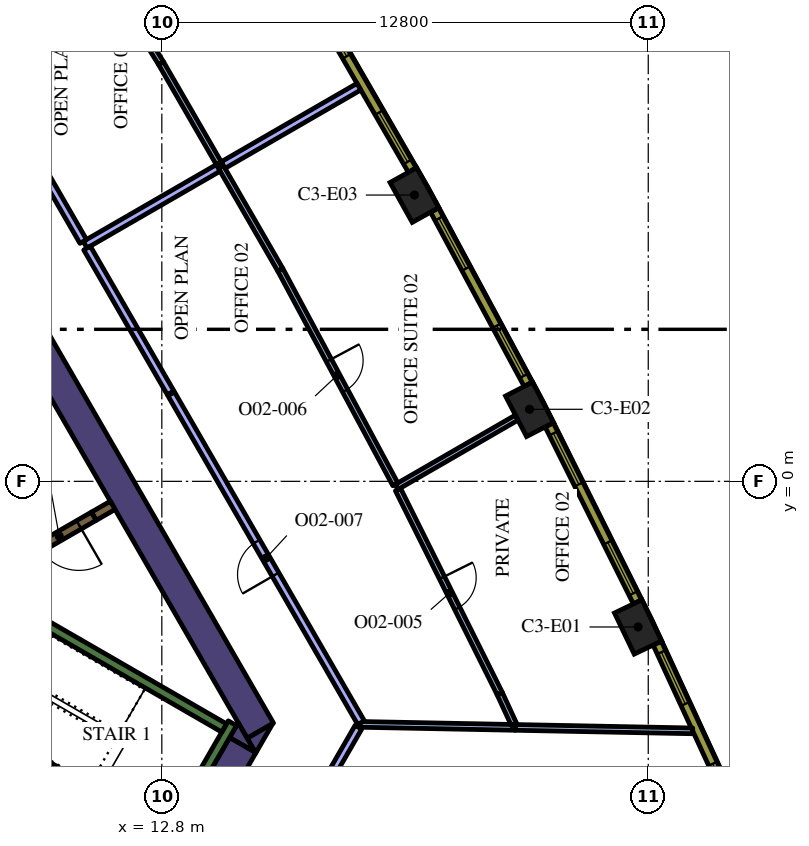
"""IFC4 building model, lengths in metres.
Left out: names, types, materials, properties, quantities, classifications, styles, units other than length and angle.
Written with IfcOpenShell. Run it as: python <this file> out.ifc"""

import sys

from ifc_helpers import new_model, si_unit, direction, frame, frame_2d, origin, origin_2d, place, context, subcontext, project, spatial, polyline, rectangle, outline, extrude, element, fill, save


model = new_model("IFC4")
c1 = context("Model", 3, precision=1e-05, world=origin(), true_north=direction((0.0, 1.0)))
c2 = subcontext(c1, "Body", "Model", "MODEL_VIEW")
j1 = project(units=[si_unit("LENGTHUNIT", "METRE"), si_unit("PLANEANGLEUNIT", "RADIAN")], contexts=[c1])
p1 = place(None, origin())
s1 = spatial("IfcSite", under=j1, at=p1, CompositionType="ELEMENT")
p2 = place(p1, origin())
s2 = spatial("IfcBuilding", under=s1, at=p2, CompositionType="ELEMENT")
p3 = place(p2, frame((0.0, 0.0, 154.2)))
s3 = spatial("IfcBuildingStorey", under=s2, at=p3, CompositionType="ELEMENT", Elevation=154.2)
for number, where, z_axis, x_axis in (
    (1, (25.332, -3.832, 0.0), (0.0, 0.0, 1.0), (-0.433, 0.902, 0.0)),
    (2, (22.476, 1.896, 0.0), (0.0, 0.0, 1.0), (-0.46, 0.888, 0.0)),
    (3, (19.447, 7.533, 0.0), (0.0, 0.0, 1.0), (-0.487, 0.874, 0.0)),
):
    element("IfcColumn", number, at=place(p3, frame(where, z_axis=z_axis, x_axis=x_axis)), inside=s3, PredefinedType="COLUMN", context=c2, shape_type="SweptSolid", body=[
        extrude(rectangle(XDim=1.2, YDim=0.8, at=origin_2d()), origin(), (0.0, 0.0, 1.0), 4.2),
    ])
p4 = place(p3, frame((9.129, 4.289, 0.0), z_axis=(0.0, 0.0, 1.0), x_axis=(0.499995742806, -0.866027861663, 0.0)))
e4 = element("IfcWall", 4, at=p4, inside=s3, PredefinedType="SOLIDWALL", context=c2, shape_type="SweptSolid", body=[
    extrude(rectangle(XDim=12.527, YDim=0.8, at=frame_2d((6.264, 0.0))), origin(), (0.0, 0.0, 1.0), 4.2),
])
p5 = place(p3, origin())
e5 = element("IfcWall", 5, at=p5, inside=s3, PredefinedType="SOLIDWALL", context=c2, shape_type="SweptSolid", body=[
    extrude(outline(polyline([(15.271, -7.15), (15.047, -6.762), (15.719, -6.374), (15.271, -7.15)])), origin(), (0.0, 0.0, 1.0), 4.2),
])
p6 = place(p3, frame((13.018, -10.252, 0.0), z_axis=(0.0, 0.0, 1.0), x_axis=(0.499984020225, 0.866034629516, 0.0)))
e6 = element("IfcWall", 6, at=p6, inside=s3, PredefinedType="SOLIDWALL", context=c2, shape_type="SweptSolid", body=[
    extrude(rectangle(XDim=3.824, YDim=0.8, at=frame_2d((1.912, 0.0))), origin(), (0.0, 0.0, 1.0), 4.2),
])
e7 = element("IfcWall", 7, at=p5, inside=s3, PredefinedType="SOLIDWALL", context=c2, shape_type="SweptSolid", body=[
    extrude(outline(polyline([(14.809, -6.35), (15.257, -7.126), (14.585, -6.738), (14.809, -6.35)])), origin(), (0.0, 0.0, 1.0), 4.2),
])
p7 = place(p3, frame((12.84, -9.511, 0.0), z_axis=(0.0, 0.0, 1.0), x_axis=(0.499997733992, 0.866026712061, 0.0)))
e8 = element("IfcWall", 8, at=p7, inside=s3, PredefinedType="SOLIDWALL", context=c2, shape_type="SweptSolid", body=[
    extrude(rectangle(XDim=3.634, YDim=0.25, at=frame_2d((1.817, 0.0))), origin(), (0.0, 0.0, 1.0), 4.2),
])
p8 = place(p3, frame((12.84, -9.261, 0.0), z_axis=(0.0, 0.0, 1.0), x_axis=(-0.866013990052, 0.500019768644, 0.0)))
e9 = element("IfcWall", 9, at=p8, inside=s3, PredefinedType="SOLIDWALL", context=c2, shape_type="SweptSolid", body=[
    extrude(rectangle(XDim=6.8, YDim=0.25, at=frame_2d((3.4, 0.0))), origin(), (0.0, 0.0, 1.0), 4.2),
])
p9 = place(p3, frame((8.334, -2.964, 0.0), z_axis=(0.0, 0.0, 1.0), x_axis=(0.866016039709, -0.500016218704, 0.0)))
e10 = element("IfcWall", 10, at=p9, inside=s3, PredefinedType="SOLIDWALL", context=c2, shape_type="SweptSolid", body=[
    extrude(rectangle(XDim=7.05, YDim=0.25, at=frame_2d((3.525, 0.0))), origin(), (0.0, 0.0, 1.0), 4.2),
])
p10 = place(p3, frame((11.507, -0.631, 0.0), z_axis=(0.0, 0.0, 1.0), x_axis=(-0.866093731455, -0.499881634324, 0.0)))
e11 = element("IfcWall", 11, at=p10, inside=s3, PredefinedType="SOLIDWALL", context=c2, shape_type="SweptSolid", body=[
    extrude(rectangle(XDim=0.575, YDim=0.25, at=frame_2d((0.288, 0.0))), origin(), (0.0, 0.0, 1.0), 4.2),
])
p11 = place(p3, frame((11.009, -0.919, 0.0), z_axis=(0.0, 0.0, 1.0), x_axis=(-0.866059744384, -0.49994051562, 0.0)))
e12 = element("IfcWall", 12, at=p11, inside=s3, PredefinedType="SOLIDWALL", context=c2, shape_type="SweptSolid", body=[
    extrude(rectangle(XDim=2.1, YDim=0.25, at=frame_2d((1.05, 0.0))), origin(), (0.0, 0.0, 1.0), 4.2),
])
p12 = place(p11, frame((0.45, 0.0, 0.0)))
e13 = element("IfcOpeningElement", 13, at=p12, cuts=e12, PredefinedType="OPENING", context=c2, shape_type="SweptSolid", body=[
    extrude(rectangle(XDim=1.2, YDim=2.1, at=frame_2d((0.6, 1.05))), frame((0.0, 0.135, 0.0), z_axis=(0.0, -1.0, 0.0), x_axis=(1.0, 0.0, 0.0)), (0.0, 0.0, 1.0), 0.27),
])
p13 = place(p3, frame((22.097, -6.474, 0.0), z_axis=(0.0, 0.0, 1.0), x_axis=(0.999810044283, -0.019490391268, 0.0)))
e14 = element("IfcWall", 14, at=p13, inside=s3, PredefinedType="PARTITIONING", context=c2, shape_type="SweptSolid", body=[
    extrude(rectangle(XDim=4.672, YDim=0.15, at=frame_2d((2.336, 0.0))), origin(), (0.0, 0.0, 1.0), 3.15),
])
p14 = place(p3, frame((18.016, -6.395, 0.0), z_axis=(0.0, 0.0, 1.0), x_axis=(0.999808348885, -0.019577167837, 0.0)))
e15 = element("IfcWall", 15, at=p14, inside=s3, PredefinedType="PARTITIONING", context=c2, shape_type="SweptSolid", body=[
    extrude(rectangle(XDim=4.09, YDim=0.15, at=frame_2d((2.045, 0.0))), origin(), (0.0, 0.0, 1.0), 3.15),
])
p15 = place(p3, frame((16.896, -8.335, 0.0), z_axis=(0.0, 0.0, 1.0), x_axis=(0.500026504619, 0.866010100794, 0.0)))
e16 = element("IfcWall", 16, at=p15, inside=s3, PredefinedType="PARTITIONING", context=c2, shape_type="SweptSolid", body=[
    extrude(rectangle(XDim=2.155, YDim=0.2, at=frame_2d((1.077, 0.0))), origin(), (0.0, 0.0, 1.0), 3.15),
])
p16 = place(p3, frame((18.98, -0.147, 0.0), z_axis=(0.0, 0.0, 1.0), x_axis=(0.866035116605, 0.499983176524, 0.0)))
e17 = element("IfcWall", 17, at=p16, inside=s3, PredefinedType="PARTITIONING", context=c2, shape_type="SweptSolid", body=[
    extrude(rectangle(XDim=3.648, YDim=0.15, at=frame_2d((1.824, 0.0))), origin(), (0.0, 0.0, 1.0), 3.15),
])
p17 = place(p3, frame((22.067, -6.399, 0.0), z_axis=(0.0, 0.0, 1.0), x_axis=(-0.418629119493, 0.908157288311, 0.0)))
e18 = element("IfcWall", 18, at=p17, inside=s3, PredefinedType="PARTITIONING", context=c2, shape_type="SweptSolid", body=[
    extrude(rectangle(XDim=0.902, YDim=0.15, at=frame_2d((0.451, 0.0))), origin(), (0.0, 0.0, 1.0), 3.15),
])
p18 = place(p3, frame((19.014, -0.214, 0.0), z_axis=(0.0, 0.0, 1.0), x_axis=(0.446219729364, -0.894923434225, 0.0)))
e19 = element("IfcWall", 19, at=p18, inside=s3, PredefinedType="PARTITIONING", context=c2, shape_type="SweptSolid", body=[
    extrude(rectangle(XDim=5.995, YDim=0.15, at=frame_2d((2.998, 0.0))), origin(), (0.0, 0.0, 1.0), 3.15),
])
p19 = place(p18, frame((2.595, 0.0, 0.0)))
e20 = element("IfcOpeningElement", 20, at=p19, cuts=e19, PredefinedType="OPENING", context=c2, shape_type="SweptSolid", body=[
    extrude(rectangle(XDim=0.9, YDim=2.1, at=frame_2d((0.45, 1.05))), frame((0.0, 0.085, 0.0), z_axis=(0.0, -1.0, 0.0), x_axis=(1.0, 0.0, 0.0)), (0.0, 0.0, 1.0), 0.17),
])
p20 = place(p3, frame((15.917, 5.566, 0.0), z_axis=(0.0, 0.0, 1.0), x_axis=(0.472485737981, -0.881338316088, 0.0)))
e21 = element("IfcWall", 21, at=p20, inside=s3, PredefinedType="PARTITIONING", context=c2, shape_type="SweptSolid", body=[
    extrude(rectangle(XDim=6.407, YDim=0.15, at=frame_2d((3.204, 0.0))), origin(), (0.0, 0.0, 1.0), 3.15),
])
p21 = place(p20, frame((2.707, 0.0, 0.0)))
e22 = element("IfcOpeningElement", 22, at=p21, cuts=e21, PredefinedType="OPENING", context=c2, shape_type="SweptSolid", body=[
    extrude(rectangle(XDim=0.9, YDim=2.1, at=frame_2d((0.45, 1.05))), frame((0.0, 0.085, 0.0), z_axis=(0.0, -1.0, 0.0), x_axis=(1.0, 0.0, 0.0)), (0.0, 0.0, 1.0), 0.17),
])
p22 = place(p3, frame((15.917, 5.566, 0.0), z_axis=(0.0, 0.0, 1.0), x_axis=(-0.499996312652, 0.866027532665, 0.0)))
e23 = element("IfcWall", 23, at=p22, inside=s3, PredefinedType="PARTITIONING", context=c2, shape_type="SweptSolid", body=[
    extrude(rectangle(XDim=3.138, YDim=0.15, at=frame_2d((1.569, 0.0))), origin(), (0.0, 0.0, 1.0), 3.15),
])
p23 = place(p3, frame((14.413, 8.322, 0.0), z_axis=(0.0, 0.0, 1.0), x_axis=(0.866034795751, 0.499983732284, 0.0)))
e24 = element("IfcWall", 24, at=p23, inside=s3, PredefinedType="PARTITIONING", context=c2, shape_type="SweptSolid", body=[
    extrude(rectangle(XDim=4.125, YDim=0.2, at=frame_2d((2.062, 0.0))), origin(), (0.0, 0.0, 1.0), 3.15),
])
p24 = place(p3, frame((10.782, 6.225, 0.0), z_axis=(0.0, 0.0, 1.0), x_axis=(0.866034752867, 0.499983806564, 0.0)))
e25 = element("IfcWall", 25, at=p24, inside=s3, PredefinedType="PARTITIONING", context=c2, shape_type="SweptSolid", body=[
    extrude(rectangle(XDim=4.043, YDim=0.2, at=frame_2d((2.021, 0.0))), origin(), (0.0, 0.0, 1.0), 3.15),
])
p25 = place(p3, frame((13.032, 2.328, 0.0), z_axis=(0.0, 0.0, 1.0), x_axis=(-0.499988222896, 0.866032203192, 0.0)))
e26 = element("IfcWall", 26, at=p25, inside=s3, PredefinedType="PARTITIONING", context=c2, shape_type="SweptSolid", body=[
    extrude(rectangle(XDim=4.4, YDim=0.2, at=frame_2d((2.2, 0.0))), origin(), (0.0, 0.0, 1.0), 3.15),
])
p26 = place(p3, frame((18.042, -6.35, 0.0), z_axis=(0.0, 0.0, 1.0), x_axis=(-0.499986873641, 0.866032982159, 0.0)))
e27 = element("IfcWall", 27, at=p26, inside=s3, PredefinedType="PARTITIONING", context=c2, shape_type="SweptSolid", body=[
    extrude(rectangle(XDim=9.99, YDim=0.2, at=frame_2d((4.995, 0.0))), origin(), (0.0, 0.0, 1.0), 3.15),
])
p27 = place(p26, frame((4.5, 0.0, 0.0)))
e28 = element("IfcOpeningElement", 28, at=p27, cuts=e27, PredefinedType="OPENING", context=c2, shape_type="SweptSolid", body=[
    extrude(rectangle(XDim=1.0, YDim=2.1, at=frame_2d((0.5, 1.05))), frame((0.0, 0.11, 0.0), z_axis=(0.0, -1.0, 0.0), x_axis=(1.0, 0.0, 0.0)), (0.0, 0.0, 1.0), 0.22),
])
p28 = place(p3, frame((14.299, 8.371, 0.0), z_axis=(0.0, 0.0, 1.0), x_axis=(-0.500019211527, 0.86601431172, 0.0)))
e29 = element("IfcWall", 29, at=p28, inside=s3, PredefinedType="PARTITIONING", context=c2, shape_type="SweptSolid", body=[
    extrude(rectangle(XDim=3.039, YDim=0.15, at=frame_2d((1.519, 0.0))), origin(), (0.0, 0.0, 1.0), 3.15),
])
p29 = place(p3, frame((9.403, 16.447, 0.0), z_axis=(0.0, 0.0, 1.0), x_axis=(0.527026092571, -0.849849102929, 0.0)))
e30 = element("IfcWall", 30, at=p29, inside=s3, PredefinedType="PARTITIONING", context=c2, shape_type="SweptSolid", body=[
    extrude(rectangle(XDim=6.407, YDim=0.15, at=frame_2d((3.204, 0.0))), origin(), (0.0, 0.0, 1.0), 3.15),
])
p30 = place(p29, frame((2.707, 0.0, 0.0)))
e31 = element("IfcOpeningElement", 31, at=p30, cuts=e30, PredefinedType="OPENING", context=c2, shape_type="SweptSolid", body=[
    extrude(rectangle(XDim=0.9, YDim=2.1, at=frame_2d((0.45, 1.05))), frame((0.0, 0.085, 0.0), z_axis=(0.0, -1.0, 0.0), x_axis=(1.0, 0.0, 0.0)), (0.0, 0.0, 1.0), 0.17),
])
p31 = place(p3, frame((10.732, 6.312, 0.0), z_axis=(0.0, 0.0, 1.0), x_axis=(-0.499984786451, 0.866034187153, 0.0)))
e32 = element("IfcWall", 32, at=p31, inside=s3, PredefinedType="PARTITIONING", context=c2, shape_type="SweptSolid", body=[
    extrude(rectangle(XDim=4.404, YDim=0.2, at=frame_2d((2.202, 0.0))), origin(), (0.0, 0.0, 1.0), 3.15),
])
p32 = place(p3, frame((28.02, -8.992, 0.0), z_axis=(0.0, 0.0, 1.0), x_axis=(-0.418722559465, 0.908114209885, 0.0)))
e33 = element("IfcWall", 33, at=p32, inside=s3, PredefinedType="SOLIDWALL", context=c2, shape_type="SweptSolid", body=[
    extrude(rectangle(XDim=5.213, YDim=0.24, at=frame_2d((2.606, 0.0))), origin(), (0.0, 0.0, 1.0), 3.95),
])
p33 = place(p32, frame((0.221, 0.0, 0.9)))
e34 = element("IfcOpeningElement", 34, at=p33, cuts=e33, PredefinedType="OPENING", context=c2, shape_type="SweptSolid", body=[
    extrude(rectangle(XDim=1.5, YDim=2.55, at=frame_2d((0.75, 1.275))), frame((0.0, 0.13, 0.0), z_axis=(0.0, -1.0, 0.0), x_axis=(1.0, 0.0, 0.0)), (0.0, 0.0, 1.0), 0.26),
])
p34 = place(p32, frame((3.452, 0.0, 0.9)))
e35 = element("IfcOpeningElement", 35, at=p34, cuts=e33, PredefinedType="OPENING", context=c2, shape_type="SweptSolid", body=[
    extrude(rectangle(XDim=1.5, YDim=2.55, at=frame_2d((0.75, 1.275))), frame((0.0, 0.13, 0.0), z_axis=(0.0, -1.0, 0.0), x_axis=(1.0, 0.0, 0.0)), (0.0, 0.0, 1.0), 0.26),
])
p35 = place(p3, frame((25.316, -3.171, 0.0), z_axis=(0.0, 0.0, 1.0), x_axis=(-0.446256171312, 0.8949052629, 0.0)))
e36 = element("IfcWall", 36, at=p35, inside=s3, PredefinedType="SOLIDWALL", context=c2, shape_type="SweptSolid", body=[
    extrude(rectangle(XDim=5.203, YDim=0.24, at=frame_2d((2.602, 0.0))), origin(), (0.0, 0.0, 1.0), 3.95),
])
p36 = place(p35, frame((0.248, 0.0, 0.9)))
e37 = element("IfcOpeningElement", 37, at=p36, cuts=e36, PredefinedType="OPENING", context=c2, shape_type="SweptSolid", body=[
    extrude(rectangle(XDim=1.5, YDim=2.55, at=frame_2d((0.75, 1.275))), frame((0.0, 0.13, 0.0), z_axis=(0.0, -1.0, 0.0), x_axis=(1.0, 0.0, 0.0)), (0.0, 0.0, 1.0), 0.26),
])
p37 = place(p35, frame((3.455, 0.0, 0.9)))
e38 = element("IfcOpeningElement", 38, at=p37, cuts=e36, PredefinedType="OPENING", context=c2, shape_type="SweptSolid", body=[
    extrude(rectangle(XDim=1.5, YDim=2.55, at=frame_2d((0.75, 1.275))), frame((0.0, 0.13, 0.0), z_axis=(0.0, -1.0, 0.0), x_axis=(1.0, 0.0, 0.0)), (0.0, 0.0, 1.0), 0.26),
])
p38 = place(p3, frame((22.44, 2.555, 0.0), z_axis=(0.0, 0.0, 1.0), x_axis=(-0.473349833294, 0.880874528704, 0.0)))
e39 = element("IfcWall", 39, at=p38, inside=s3, PredefinedType="SOLIDWALL", context=c2, shape_type="SweptSolid", body=[
    extrude(rectangle(XDim=5.204, YDim=0.24, at=frame_2d((2.602, 0.0))), origin(), (0.0, 0.0, 1.0), 3.95),
])
p39 = place(p38, frame((0.248, 0.0, 0.9)))
e40 = element("IfcOpeningElement", 40, at=p39, cuts=e39, PredefinedType="OPENING", context=c2, shape_type="SweptSolid", body=[
    extrude(rectangle(XDim=1.5, YDim=2.55, at=frame_2d((0.75, 1.275))), frame((0.0, 0.13, 0.0), z_axis=(0.0, -1.0, 0.0), x_axis=(1.0, 0.0, 0.0)), (0.0, 0.0, 1.0), 0.26),
])
p40 = place(p38, frame((3.455, 0.0, 0.9)))
e41 = element("IfcOpeningElement", 41, at=p40, cuts=e39, PredefinedType="OPENING", context=c2, shape_type="SweptSolid", body=[
    extrude(rectangle(XDim=1.5, YDim=2.55, at=frame_2d((0.75, 1.275))), frame((0.0, 0.13, 0.0), z_axis=(0.0, -1.0, 0.0), x_axis=(1.0, 0.0, 0.0)), (0.0, 0.0, 1.0), 0.26),
])
p41 = place(p3, frame((19.391, 8.191, 0.0), z_axis=(0.0, 0.0, 1.0), x_axis=(-0.500009456303, 0.866019944116, 0.0)))
e42 = element("IfcWall", 42, at=p41, inside=s3, PredefinedType="SOLIDWALL", context=c2, shape_type="SweptSolid", body=[
    extrude(rectangle(XDim=5.204, YDim=0.24, at=frame_2d((2.602, 0.0))), origin(), (0.0, 0.0, 1.0), 3.95),
])
p42 = place(p41, frame((0.248, 0.0, 0.9)))
e43 = element("IfcOpeningElement", 43, at=p42, cuts=e42, PredefinedType="OPENING", context=c2, shape_type="SweptSolid", body=[
    extrude(rectangle(XDim=1.5, YDim=2.55, at=frame_2d((0.75, 1.275))), frame((0.0, 0.13, 0.0), z_axis=(0.0, -1.0, 0.0), x_axis=(1.0, 0.0, 0.0)), (0.0, 0.0, 1.0), 0.26),
])
p43 = place(p41, frame((3.455, 0.0, 0.9)))
e44 = element("IfcOpeningElement", 44, at=p43, cuts=e42, PredefinedType="OPENING", context=c2, shape_type="SweptSolid", body=[
    extrude(rectangle(XDim=1.5, YDim=2.55, at=frame_2d((0.75, 1.275))), frame((0.0, 0.13, 0.0), z_axis=(0.0, -1.0, 0.0), x_axis=(1.0, 0.0, 0.0)), (0.0, 0.0, 1.0), 0.26),
])
p44 = place(p12, origin())
e45 = element("IfcDoor", 45, at=p44, inside=s3, OperationType="SINGLE_SWING_LEFT", PredefinedType="DOOR", context=c2, shape_type="SweptSolid", body=[
    extrude(rectangle(XDim=1.2, YDim=2.1, at=frame_2d((0.6, 1.05))), frame((0.0, 0.025, 0.0), z_axis=(0.0, -1.0, 0.0), x_axis=(1.0, 0.0, 0.0)), (0.0, 0.0, 1.0), 0.05),
])
fill(e13, e45)
p45 = place(p19, origin())
e46 = element("IfcDoor", 46, at=p45, inside=s3, OperationType="SINGLE_SWING_RIGHT", PredefinedType="DOOR", context=c2, shape_type="SweptSolid", body=[
    extrude(rectangle(XDim=0.9, YDim=2.1, at=frame_2d((0.45, 1.05))), frame((0.0, 0.025, 0.0), z_axis=(0.0, -1.0, 0.0), x_axis=(1.0, 0.0, 0.0)), (0.0, 0.0, 1.0), 0.05),
])
fill(e20, e46)
p46 = place(p21, origin())
e47 = element("IfcDoor", 47, at=p46, inside=s3, OperationType="SINGLE_SWING_LEFT", PredefinedType="DOOR", context=c2, shape_type="SweptSolid", body=[
    extrude(rectangle(XDim=0.9, YDim=2.1, at=frame_2d((0.45, 1.05))), frame((0.0, 0.025, 0.0), z_axis=(0.0, -1.0, 0.0), x_axis=(1.0, 0.0, 0.0)), (0.0, 0.0, 1.0), 0.05),
])
fill(e22, e47)
p47 = place(p27, origin())
e48 = element("IfcDoor", 48, at=p47, inside=s3, OperationType="SINGLE_SWING_RIGHT", PredefinedType="DOOR", context=c2, shape_type="SweptSolid", body=[
    extrude(rectangle(XDim=1.0, YDim=2.1, at=frame_2d((0.5, 1.05))), frame((0.0, 0.025, 0.0), z_axis=(0.0, -1.0, 0.0), x_axis=(1.0, 0.0, 0.0)), (0.0, 0.0, 1.0), 0.05),
])
fill(e28, e48)
p48 = place(p33, origin())
e49 = element("IfcWindow", 49, at=p48, inside=s3, PartitioningType="SINGLE_PANEL", PredefinedType="WINDOW", context=c2, shape_type="SweptSolid", body=[
    extrude(rectangle(XDim=1.5, YDim=2.55, at=frame_2d((0.75, 1.275))), frame((0.0, 0.04, 0.0), z_axis=(0.0, -1.0, 0.0), x_axis=(1.0, 0.0, 0.0)), (0.0, 0.0, 1.0), 0.06),
])
fill(e34, e49)
p49 = place(p34, origin())
e50 = element("IfcWindow", 50, at=p49, inside=s3, PartitioningType="SINGLE_PANEL", PredefinedType="WINDOW", context=c2, shape_type="SweptSolid", body=[
    extrude(rectangle(XDim=1.5, YDim=2.55, at=frame_2d((0.75, 1.275))), frame((0.0, 0.04, 0.0), z_axis=(0.0, -1.0, 0.0), x_axis=(1.0, 0.0, 0.0)), (0.0, 0.0, 1.0), 0.06),
])
fill(e35, e50)
p50 = place(p36, origin())
e51 = element("IfcWindow", 51, at=p50, inside=s3, PartitioningType="SINGLE_PANEL", PredefinedType="WINDOW", context=c2, shape_type="SweptSolid", body=[
    extrude(rectangle(XDim=1.5, YDim=2.55, at=frame_2d((0.75, 1.275))), frame((0.0, 0.04, 0.0), z_axis=(0.0, -1.0, 0.0), x_axis=(1.0, 0.0, 0.0)), (0.0, 0.0, 1.0), 0.06),
])
fill(e37, e51)
p51 = place(p37, origin())
e52 = element("IfcWindow", 52, at=p51, inside=s3, PartitioningType="SINGLE_PANEL", PredefinedType="WINDOW", context=c2, shape_type="SweptSolid", body=[
    extrude(rectangle(XDim=1.5, YDim=2.55, at=frame_2d((0.75, 1.275))), frame((0.0, 0.04, 0.0), z_axis=(0.0, -1.0, 0.0), x_axis=(1.0, 0.0, 0.0)), (0.0, 0.0, 1.0), 0.06),
])
fill(e38, e52)
p52 = place(p39, origin())
e53 = element("IfcWindow", 53, at=p52, inside=s3, PartitioningType="SINGLE_PANEL", PredefinedType="WINDOW", context=c2, shape_type="SweptSolid", body=[
    extrude(rectangle(XDim=1.5, YDim=2.55, at=frame_2d((0.75, 1.275))), frame((0.0, 0.04, 0.0), z_axis=(0.0, -1.0, 0.0), x_axis=(1.0, 0.0, 0.0)), (0.0, 0.0, 1.0), 0.06),
])
fill(e40, e53)
p53 = place(p40, origin())
e54 = element("IfcWindow", 54, at=p53, inside=s3, PartitioningType="SINGLE_PANEL", PredefinedType="WINDOW", context=c2, shape_type="SweptSolid", body=[
    extrude(rectangle(XDim=1.5, YDim=2.55, at=frame_2d((0.75, 1.275))), frame((0.0, 0.04, 0.0), z_axis=(0.0, -1.0, 0.0), x_axis=(1.0, 0.0, 0.0)), (0.0, 0.0, 1.0), 0.06),
])
fill(e41, e54)
p54 = place(p42, origin())
e55 = element("IfcWindow", 55, at=p54, inside=s3, PartitioningType="SINGLE_PANEL", PredefinedType="WINDOW", context=c2, shape_type="SweptSolid", body=[
    extrude(rectangle(XDim=1.5, YDim=2.55, at=frame_2d((0.75, 1.275))), frame((0.0, 0.04, 0.0), z_axis=(0.0, -1.0, 0.0), x_axis=(1.0, 0.0, 0.0)), (0.0, 0.0, 1.0), 0.06),
])
fill(e43, e55)
p55 = place(p43, origin())
e56 = element("IfcWindow", 56, at=p55, inside=s3, PartitioningType="SINGLE_PANEL", PredefinedType="WINDOW", context=c2, shape_type="SweptSolid", body=[
    extrude(rectangle(XDim=1.5, YDim=2.55, at=frame_2d((0.75, 1.275))), frame((0.0, 0.04, 0.0), z_axis=(0.0, -1.0, 0.0), x_axis=(1.0, 0.0, 0.0)), (0.0, 0.0, 1.0), 0.06),
])
fill(e44, e56)
save(model, sys.argv[1])
